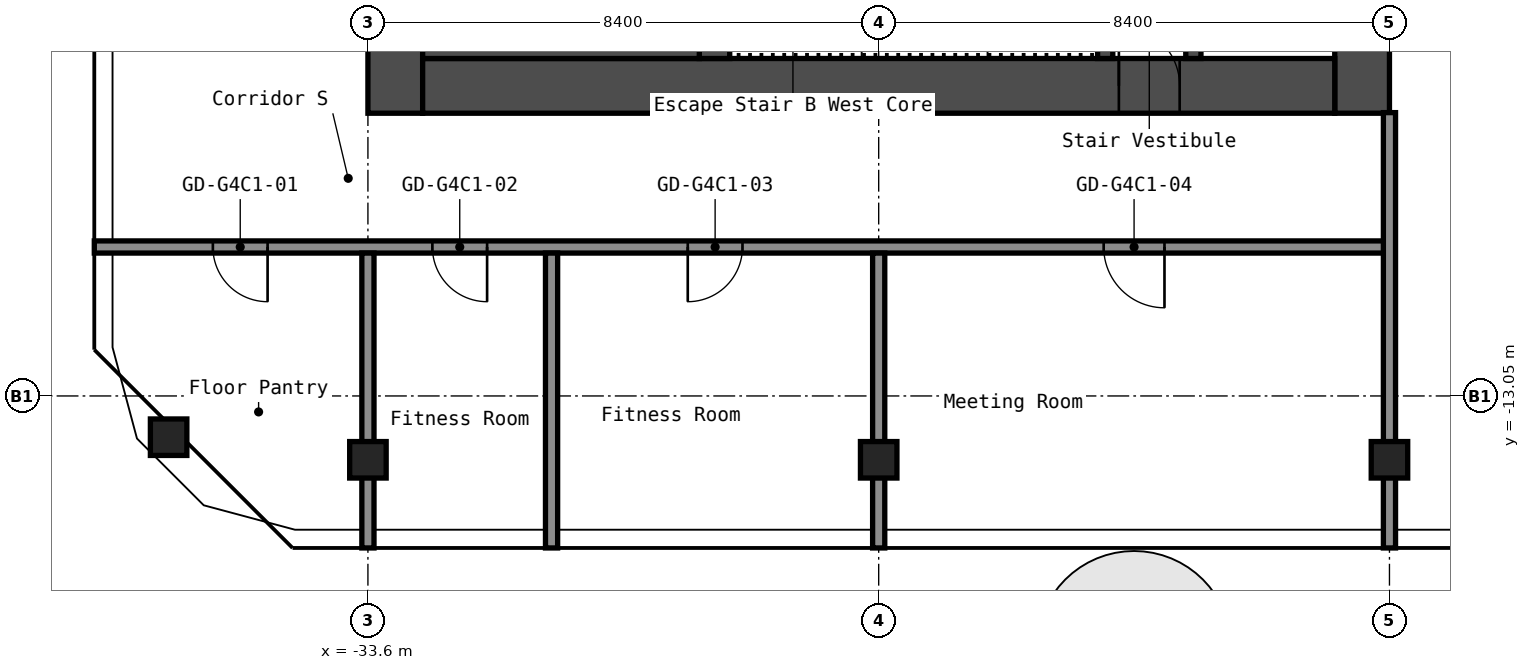
"""IFC4 building model, lengths in metres.
Left out: names, types, materials, properties, quantities, classifications, styles, units other than length and angle.
Written with IfcOpenShell. Run it as: python <this file> out.ifc"""

import sys

from ifc_helpers import new_model, si_unit, direction, frame, frame_2d, origin, origin_2d, place, context, subcontext, project, spatial, rectangle, hollow_rectangle, extrude, element, fill, save


model = new_model("IFC4")
c1 = context("Model", 3, precision=1e-05, world=origin(), true_north=direction((0.0, 1.0)))
c2 = subcontext(c1, "Body", "Model", "MODEL_VIEW")
j1 = project(units=[si_unit("LENGTHUNIT", "METRE"), si_unit("PLANEANGLEUNIT", "RADIAN")], contexts=[c1])
p1 = place(None, origin())
s1 = spatial("IfcSite", under=j1, at=p1, CompositionType="ELEMENT")
p2 = place(p1, origin())
s2 = spatial("IfcBuilding", under=s1, at=p2, CompositionType="ELEMENT")
p3 = place(p2, frame((0.0, 0.0, 209.0)))
s3 = spatial("IfcBuildingStorey", under=s2, at=p3, CompositionType="ELEMENT", Elevation=209.0)
for number, where, z_axis, x_axis in (
    (1, (-36.878, -13.729, 0.0), (0.0, 0.0, 1.0), (1.0, 0.0, 0.0)),
    (2, (-33.6, -14.1, 0.0), (0.0, 0.0, 1.0), (1.0, 0.0, 0.0)),
    (3, (-25.2, -14.1, 0.0), (0.0, 0.0, 1.0), (1.0, 0.0, 0.0)),
    (4, (-16.8, -14.1, 0.0), (0.0, 0.0, 1.0), (1.0, 0.0, 0.0)),
):
    element("IfcColumn", number, at=place(p3, frame(where, z_axis=z_axis, x_axis=x_axis)), inside=s3, PredefinedType="COLUMN", context=c2, shape_type="SweptSolid", body=[
        extrude(hollow_rectangle(XDim=0.6, YDim=0.6, WallThickness=0.025, InnerFilletRadius=0.038, OuterFilletRadius=0.062, at=origin_2d()), origin(), (0.0, 0.0, 1.0), 2.75),
    ])
p4 = place(p3, frame((-17.25, -8.4, 0.0), z_axis=(0.0, 0.0, 1.0), x_axis=(0.0, 1.0, 0.0)))
e5 = element("IfcWall", 5, at=p4, inside=s3, PredefinedType="SHEAR", context=c2, shape_type="SweptSolid", body=[
    extrude(rectangle(XDim=16.8, YDim=0.9, at=frame_2d((8.4, 0.0))), origin(), (0.0, 0.0, 1.0), 2.75),
])
p5 = place(p4, frame((10.1, 0.0, 0.0)))
e6 = element("IfcOpeningElement", 6, at=p5, cuts=e5, PredefinedType="OPENING", context=c2, shape_type="SweptSolid", body=[
    extrude(rectangle(XDim=1.6, YDim=2.1, at=frame_2d((0.8, 1.05))), frame((0.0, 0.46, 0.0), z_axis=(0.0, -1.0, 0.0), x_axis=(1.0, 0.0, 0.0)), (0.0, 0.0, 1.0), 0.92),
])
p6 = place(p3, frame((-33.15, -8.4, 0.0), z_axis=(0.0, 0.0, 1.0), x_axis=(0.0, 1.0, 0.0)))
e7 = element("IfcWall", 7, at=p6, inside=s3, PredefinedType="SHEAR", context=c2, shape_type="SweptSolid", body=[
    extrude(rectangle(XDim=16.8, YDim=0.9, at=frame_2d((8.4, 0.0))), origin(), (0.0, 0.0, 1.0), 2.75),
])
p7 = place(p3, frame((-32.7, -7.95, 0.0), z_axis=(0.0, 0.0, 1.0), x_axis=(1.0, 0.0, 0.0)))
e8 = element("IfcWall", 8, at=p7, inside=s3, PredefinedType="SHEAR", context=c2, shape_type="SweptSolid", body=[
    extrude(rectangle(XDim=15.0, YDim=0.9, at=frame_2d((7.5, 0.0))), origin(), (0.0, 0.0, 1.0), 2.75),
])
p8 = place(p7, frame((11.45, 0.0, 0.0)))
e9 = element("IfcOpeningElement", 9, at=p8, cuts=e8, PredefinedType="OPENING", context=c2, shape_type="SweptSolid", body=[
    extrude(rectangle(XDim=1.0, YDim=2.1, at=frame_2d((0.5, 1.05))), frame((0.0, 0.46, 0.0), z_axis=(0.0, -1.0, 0.0), x_axis=(1.0, 0.0, 0.0)), (0.0, 0.0, 1.0), 0.92),
])
p9 = place(p3, frame((-20.025, -7.5, 0.0), z_axis=(0.0, 0.0, 1.0), x_axis=(0.0, 1.0, 0.0)))
e10 = element("IfcWall", 10, at=p9, inside=s3, PredefinedType="SHEAR", context=c2, shape_type="SweptSolid", body=[
    extrude(rectangle(XDim=6.3, YDim=0.25, at=frame_2d((3.15, 0.0))), origin(), (0.0, 0.0, 1.0), 2.75),
])
p10 = place(p9, frame((2.4, 0.0, 0.0)))
e11 = element("IfcOpeningElement", 11, at=p10, cuts=e10, PredefinedType="OPENING", context=c2, shape_type="SweptSolid", body=[
    extrude(rectangle(XDim=1.0, YDim=2.1, at=frame_2d((0.5, 1.05))), frame((0.0, 0.135, 0.0), z_axis=(0.0, -1.0, 0.0), x_axis=(1.0, 0.0, 0.0)), (0.0, 0.0, 1.0), 0.27),
])
p11 = place(p3, frame((-21.475, -7.5, 0.0), z_axis=(0.0, 0.0, 1.0), x_axis=(0.0, 1.0, 0.0)))
e12 = element("IfcWall", 12, at=p11, inside=s3, PredefinedType="SHEAR", context=c2, shape_type="SweptSolid", body=[
    extrude(rectangle(XDim=3.75, YDim=0.25, at=frame_2d((1.875, 0.0))), origin(), (0.0, 0.0, 1.0), 2.75),
])
p12 = place(p11, frame((1.3, 0.0, 0.0)))
e13 = element("IfcOpeningElement", 13, at=p12, cuts=e12, PredefinedType="OPENING", context=c2, shape_type="SweptSolid", body=[
    extrude(rectangle(XDim=1.2, YDim=2.1, at=frame_2d((0.6, 1.05))), frame((0.0, 0.135, 0.0), z_axis=(0.0, -1.0, 0.0), x_axis=(1.0, 0.0, 0.0)), (0.0, 0.0, 1.0), 0.27),
])
p13 = place(p3, frame((-27.9, -7.5, 0.0), z_axis=(0.0, 0.0, 1.0), x_axis=(0.0, 1.0, 0.0)))
e14 = element("IfcWall", 14, at=p13, inside=s3, PredefinedType="SHEAR", context=c2, shape_type="SweptSolid", body=[
    extrude(rectangle(XDim=3.75, YDim=0.5, at=frame_2d((1.875, 0.0))), origin(), (0.0, 0.0, 1.0), 2.75),
])
p14 = place(p3, frame((-32.7, -6.75, 0.0), z_axis=(0.0, 0.0, 1.0), x_axis=(1.0, 0.0, 0.0)))
e15 = element("IfcWall", 15, at=p14, inside=s3, PredefinedType="SHEAR", context=c2, shape_type="SweptSolid", body=[
    extrude(rectangle(XDim=4.55, YDim=1.5, at=frame_2d((2.275, 0.0))), origin(), (0.0, 0.0, 1.0), 2.75),
])
p15 = place(p3, frame((-38.1, -10.6, 0.0), z_axis=(0.0, 0.0, 1.0), x_axis=(1.0, 0.0, 0.0)))
e16 = element("IfcWall", 16, at=p15, inside=s3, PredefinedType="PARTITIONING", context=c2, shape_type="SweptSolid", body=[
    extrude(rectangle(XDim=21.3, YDim=0.2, at=frame_2d((10.65, 0.0))), origin(), (0.0, 0.0, 1.0), 2.75),
])
p16 = place(p15, frame((1.95, 0.0, 0.0)))
e17 = element("IfcOpeningElement", 17, at=p16, cuts=e16, PredefinedType="OPENING", context=c2, shape_type="SweptSolid", body=[
    extrude(rectangle(XDim=0.9, YDim=2.1, at=frame_2d((0.45, 1.05))), frame((0.0, 0.11, 0.0), z_axis=(0.0, -1.0, 0.0), x_axis=(1.0, 0.0, 0.0)), (0.0, 0.0, 1.0), 0.22),
])
p17 = place(p15, frame((5.56, 0.0, 0.0)))
e18 = element("IfcOpeningElement", 18, at=p17, cuts=e16, PredefinedType="OPENING", context=c2, shape_type="SweptSolid", body=[
    extrude(rectangle(XDim=0.9, YDim=2.1, at=frame_2d((0.45, 1.05))), frame((0.0, 0.11, 0.0), z_axis=(0.0, -1.0, 0.0), x_axis=(1.0, 0.0, 0.0)), (0.0, 0.0, 1.0), 0.22),
])
p18 = place(p15, frame((9.76, 0.0, 0.0)))
e19 = element("IfcOpeningElement", 19, at=p18, cuts=e16, PredefinedType="OPENING", context=c2, shape_type="SweptSolid", body=[
    extrude(rectangle(XDim=0.9, YDim=2.1, at=frame_2d((0.45, 1.05))), frame((0.0, 0.11, 0.0), z_axis=(0.0, -1.0, 0.0), x_axis=(1.0, 0.0, 0.0)), (0.0, 0.0, 1.0), 0.22),
])
p19 = place(p15, frame((16.6, 0.0, 0.0)))
e20 = element("IfcOpeningElement", 20, at=p19, cuts=e16, PredefinedType="OPENING", context=c2, shape_type="SweptSolid", body=[
    extrude(rectangle(XDim=1.0, YDim=2.1, at=frame_2d((0.5, 1.05))), frame((0.0, 0.11, 0.0), z_axis=(0.0, -1.0, 0.0), x_axis=(1.0, 0.0, 0.0)), (0.0, 0.0, 1.0), 0.22),
])
for number, where, z_axis, x_axis in (
    (21, (-33.6, -15.55, 0.0), (0.0, 0.0, 1.0), (0.0, 1.0, 0.0)),
    (22, (-30.58, -15.55, 0.0), (0.0, 0.0, 1.0), (0.0, 1.0, 0.0)),
    (23, (-25.2, -15.55, 0.0), (0.0, 0.0, 1.0), (0.0, 1.0, 0.0)),
):
    element("IfcWall", number, at=place(p3, frame(where, z_axis=z_axis, x_axis=x_axis)), inside=s3, PredefinedType="PARTITIONING", context=c2, shape_type="SweptSolid", body=[
        extrude(rectangle(XDim=4.85, YDim=0.2, at=frame_2d((2.425, 0.0))), origin(), (0.0, 0.0, 1.0), 2.75),
    ])
p20 = place(p3, frame((-16.8, -15.55, 0.0), z_axis=(0.0, 0.0, 1.0), x_axis=(0.0, 1.0, 0.0)))
e24 = element("IfcWall", 24, at=p20, inside=s3, PredefinedType="PARTITIONING", context=c2, shape_type="SweptSolid", body=[
    extrude(rectangle(XDim=7.16, YDim=0.2, at=frame_2d((3.58, 0.0))), origin(), (0.0, 0.0, 1.0), 2.75),
])
p21 = place(p8, origin())
e25 = element("IfcDoor", 25, at=p21, inside=s3, OperationType="SINGLE_SWING_RIGHT", PredefinedType="DOOR", context=c2, shape_type="SweptSolid", body=[
    extrude(rectangle(XDim=1.0, YDim=2.1, at=frame_2d((0.5, 1.05))), frame((0.0, 0.025, 0.0), z_axis=(0.0, -1.0, 0.0), x_axis=(1.0, 0.0, 0.0)), (0.0, 0.0, 1.0), 0.05),
])
fill(e9, e25)
p22 = place(p16, origin())
e26 = element("IfcDoor", 26, at=p22, inside=s3, OperationType="SINGLE_SWING_RIGHT", PredefinedType="DOOR", context=c2, shape_type="SweptSolid", body=[
    extrude(rectangle(XDim=0.9, YDim=2.1, at=frame_2d((0.45, 1.05))), frame((0.0, 0.025, 0.0), z_axis=(0.0, -1.0, 0.0), x_axis=(1.0, 0.0, 0.0)), (0.0, 0.0, 1.0), 0.05),
])
fill(e17, e26)
p23 = place(p17, origin())
e27 = element("IfcDoor", 27, at=p23, inside=s3, OperationType="SINGLE_SWING_RIGHT", PredefinedType="DOOR", context=c2, shape_type="SweptSolid", body=[
    extrude(rectangle(XDim=0.9, YDim=2.1, at=frame_2d((0.45, 1.05))), frame((0.0, 0.025, 0.0), z_axis=(0.0, -1.0, 0.0), x_axis=(1.0, 0.0, 0.0)), (0.0, 0.0, 1.0), 0.05),
])
fill(e18, e27)
p24 = place(p18, origin())
e28 = element("IfcDoor", 28, at=p24, inside=s3, OperationType="SINGLE_SWING_LEFT", PredefinedType="DOOR", context=c2, shape_type="SweptSolid", body=[
    extrude(rectangle(XDim=0.9, YDim=2.1, at=frame_2d((0.45, 1.05))), frame((0.0, 0.025, 0.0), z_axis=(0.0, -1.0, 0.0), x_axis=(1.0, 0.0, 0.0)), (0.0, 0.0, 1.0), 0.05),
])
fill(e19, e28)
p25 = place(p19, origin())
e29 = element("IfcDoor", 29, at=p25, inside=s3, OperationType="SINGLE_SWING_RIGHT", PredefinedType="DOOR", context=c2, shape_type="SweptSolid", body=[
    extrude(rectangle(XDim=1.0, YDim=2.1, at=frame_2d((0.5, 1.05))), frame((0.0, 0.025, 0.0), z_axis=(0.0, -1.0, 0.0), x_axis=(1.0, 0.0, 0.0)), (0.0, 0.0, 1.0), 0.05),
])
fill(e20, e29)
save(model, sys.argv[1])
